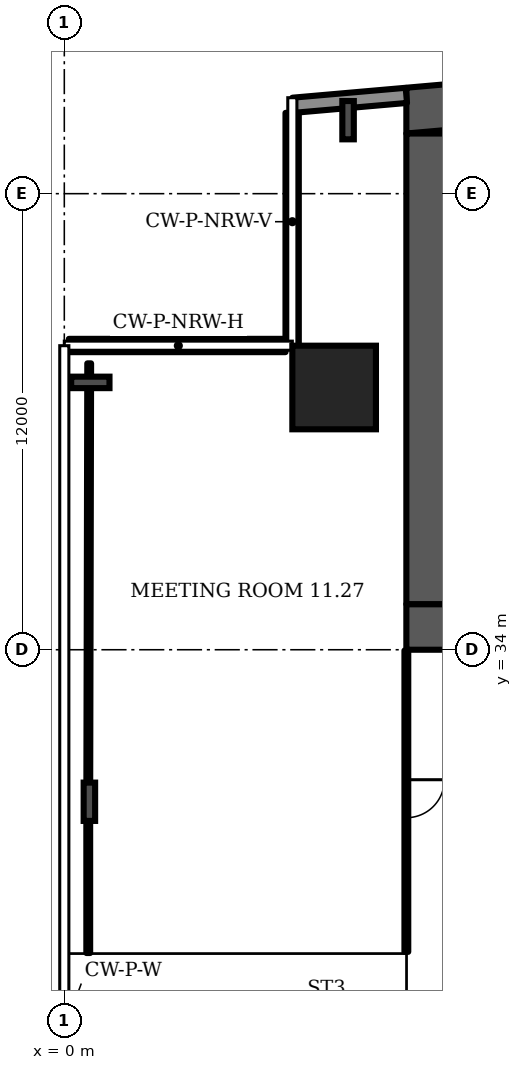
"""IFC4 building model, lengths in metres.
Left out: names, types, materials, properties, quantities, classifications, styles, units other than length and angle.
Written with IfcOpenShell. Run it as: python <this file> out.ifc"""

import sys

from ifc_helpers import new_model, si_unit, direction, frame, frame_2d, origin, origin_2d, place, context, subcontext, project, spatial, polyline, rectangle, i_section, outline, extrude, element, fill, save


model = new_model("IFC4")
c1 = context("Model", 3, precision=1e-05, world=origin(), true_north=direction((0.0, 1.0)))
c2 = subcontext(c1, "Body", "Model", "MODEL_VIEW")
j1 = project(units=[si_unit("LENGTHUNIT", "METRE"), si_unit("PLANEANGLEUNIT", "RADIAN")], contexts=[c1])
p1 = place(None, origin())
s1 = spatial("IfcSite", under=j1, at=p1, CompositionType="ELEMENT")
p2 = place(p1, origin())
s2 = spatial("IfcBuilding", under=s1, at=p2, CompositionType="ELEMENT")
p3 = place(p2, frame((0.0, 0.0, 59.5)))
s3 = spatial("IfcBuildingStorey", under=s2, at=p3, CompositionType="ELEMENT", Elevation=59.5)
p4 = place(p3, origin())
e1 = element("IfcWall", 1, at=p4, inside=s3, PredefinedType="SHEAR", context=c2, shape_type="SweptSolid", body=[
    extrude(outline(polyline([(9.0, 47.583), (37.0, 50.032), (65.0, 47.583), (65.0, 48.787), (37.0, 51.237), (9.0, 48.787), (9.0, 47.583)])), origin(), (0.0, 0.0, 1.0), 3.6),
])
p5 = place(p3, frame((9.0, 34.6, 0.0), z_axis=(0.0, 0.0, 1.0), x_axis=(1.0, 0.0, 0.0)))
e2 = element("IfcWall", 2, at=p5, inside=s3, PredefinedType="SHEAR", context=c2, shape_type="SweptSolid", body=[
    extrude(rectangle(XDim=56.0, YDim=1.2, at=frame_2d((28.0, 0.0))), origin(), (0.0, 0.0, 1.0), 3.6),
])
p6 = place(p5, frame((2.0, 0.0, 0.0)))
e3 = element("IfcOpeningElement", 3, at=p6, cuts=e2, PredefinedType="OPENING", context=c2, shape_type="SweptSolid", body=[
    extrude(rectangle(XDim=1.0, YDim=2.1, at=frame_2d((0.5, 1.05))), frame((0.0, 0.61, 0.0), z_axis=(0.0, -1.0, 0.0), x_axis=(1.0, 0.0, 0.0)), (0.0, 0.0, 1.0), 1.22),
])
p7 = place(p5, frame((4.6, 0.0, 0.0)))
e4 = element("IfcOpeningElement", 4, at=p7, cuts=e2, PredefinedType="OPENING", context=c2, shape_type="SweptSolid", body=[
    extrude(rectangle(XDim=1.0, YDim=2.1, at=frame_2d((0.5, 1.05))), frame((0.0, 0.61, 0.0), z_axis=(0.0, -1.0, 0.0), x_axis=(1.0, 0.0, 0.0)), (0.0, 0.0, 1.0), 1.22),
])
p8 = place(p5, frame((7.867, 0.0, 0.0)))
e5 = element("IfcOpeningElement", 5, at=p8, cuts=e2, PredefinedType="OPENING", context=c2, shape_type="SweptSolid", body=[
    extrude(rectangle(XDim=1.1, YDim=2.1, at=frame_2d((0.55, 1.05))), frame((0.0, 0.61, 0.0), z_axis=(0.0, -1.0, 0.0), x_axis=(1.0, 0.0, 0.0)), (0.0, 0.0, 1.0), 1.22),
])
p9 = place(p5, frame((12.033, 0.0, 0.0)))
e6 = element("IfcOpeningElement", 6, at=p9, cuts=e2, PredefinedType="OPENING", context=c2, shape_type="SweptSolid", body=[
    extrude(rectangle(XDim=1.1, YDim=2.1, at=frame_2d((0.55, 1.05))), frame((0.0, 0.61, 0.0), z_axis=(0.0, -1.0, 0.0), x_axis=(1.0, 0.0, 0.0)), (0.0, 0.0, 1.0), 1.22),
])
p10 = place(p5, frame((9.8, 0.0, 0.0)))
e7 = element("IfcOpeningElement", 7, at=p10, cuts=e2, PredefinedType="OPENING", context=c2, shape_type="SweptSolid", body=[
    extrude(rectangle(XDim=1.4, YDim=2.1, at=frame_2d((0.7, 1.05))), frame((0.0, 0.61, 0.0), z_axis=(0.0, -1.0, 0.0), x_axis=(1.0, 0.0, 0.0)), (0.0, 0.0, 1.0), 1.22),
])
p11 = place(p5, frame((14.65, 0.0, 0.0)))
e8 = element("IfcOpeningElement", 8, at=p11, cuts=e2, PredefinedType="OPENING", context=c2, shape_type="SweptSolid", body=[
    extrude(rectangle(XDim=1.2, YDim=2.1, at=frame_2d((0.6, 1.05))), frame((0.0, 0.61, 0.0), z_axis=(0.0, -1.0, 0.0), x_axis=(1.0, 0.0, 0.0)), (0.0, 0.0, 1.0), 1.22),
])
p12 = place(p5, frame((21.867, 0.0, 0.0)))
e9 = element("IfcOpeningElement", 9, at=p12, cuts=e2, PredefinedType="OPENING", context=c2, shape_type="SweptSolid", body=[
    extrude(rectangle(XDim=1.1, YDim=2.1, at=frame_2d((0.55, 1.05))), frame((0.0, 0.61, 0.0), z_axis=(0.0, -1.0, 0.0), x_axis=(1.0, 0.0, 0.0)), (0.0, 0.0, 1.0), 1.22),
])
p13 = place(p5, frame((26.033, 0.0, 0.0)))
e10 = element("IfcOpeningElement", 10, at=p13, cuts=e2, PredefinedType="OPENING", context=c2, shape_type="SweptSolid", body=[
    extrude(rectangle(XDim=1.1, YDim=2.1, at=frame_2d((0.55, 1.05))), frame((0.0, 0.61, 0.0), z_axis=(0.0, -1.0, 0.0), x_axis=(1.0, 0.0, 0.0)), (0.0, 0.0, 1.0), 1.22),
])
p14 = place(p5, frame((23.8, 0.0, 0.0)))
e11 = element("IfcOpeningElement", 11, at=p14, cuts=e2, PredefinedType="OPENING", context=c2, shape_type="SweptSolid", body=[
    extrude(rectangle(XDim=1.4, YDim=2.1, at=frame_2d((0.7, 1.05))), frame((0.0, 0.61, 0.0), z_axis=(0.0, -1.0, 0.0), x_axis=(1.0, 0.0, 0.0)), (0.0, 0.0, 1.0), 1.22),
])
p15 = place(p5, frame((28.867, 0.0, 0.0)))
e12 = element("IfcOpeningElement", 12, at=p15, cuts=e2, PredefinedType="OPENING", context=c2, shape_type="SweptSolid", body=[
    extrude(rectangle(XDim=1.1, YDim=2.1, at=frame_2d((0.55, 1.05))), frame((0.0, 0.61, 0.0), z_axis=(0.0, -1.0, 0.0), x_axis=(1.0, 0.0, 0.0)), (0.0, 0.0, 1.0), 1.22),
])
p16 = place(p5, frame((33.033, 0.0, 0.0)))
e13 = element("IfcOpeningElement", 13, at=p16, cuts=e2, PredefinedType="OPENING", context=c2, shape_type="SweptSolid", body=[
    extrude(rectangle(XDim=1.1, YDim=2.1, at=frame_2d((0.55, 1.05))), frame((0.0, 0.61, 0.0), z_axis=(0.0, -1.0, 0.0), x_axis=(1.0, 0.0, 0.0)), (0.0, 0.0, 1.0), 1.22),
])
p17 = place(p5, frame((40.15, 0.0, 0.0)))
e14 = element("IfcOpeningElement", 14, at=p17, cuts=e2, PredefinedType="OPENING", context=c2, shape_type="SweptSolid", body=[
    extrude(rectangle(XDim=1.2, YDim=2.1, at=frame_2d((0.6, 1.05))), frame((0.0, 0.61, 0.0), z_axis=(0.0, -1.0, 0.0), x_axis=(1.0, 0.0, 0.0)), (0.0, 0.0, 1.0), 1.22),
])
p18 = place(p5, frame((44.8, 0.0, 0.0)))
e15 = element("IfcOpeningElement", 15, at=p18, cuts=e2, PredefinedType="OPENING", context=c2, shape_type="SweptSolid", body=[
    extrude(rectangle(XDim=1.4, YDim=2.1, at=frame_2d((0.7, 1.05))), frame((0.0, 0.61, 0.0), z_axis=(0.0, -1.0, 0.0), x_axis=(1.0, 0.0, 0.0)), (0.0, 0.0, 1.0), 1.22),
])
p19 = place(p5, frame((49.867, 0.0, 0.0)))
e16 = element("IfcOpeningElement", 16, at=p19, cuts=e2, PredefinedType="OPENING", context=c2, shape_type="SweptSolid", body=[
    extrude(rectangle(XDim=1.1, YDim=2.1, at=frame_2d((0.55, 1.05))), frame((0.0, 0.61, 0.0), z_axis=(0.0, -1.0, 0.0), x_axis=(1.0, 0.0, 0.0)), (0.0, 0.0, 1.0), 1.22),
])
p20 = place(p5, frame((53.5, 0.0, 0.0)))
e17 = element("IfcOpeningElement", 17, at=p20, cuts=e2, PredefinedType="OPENING", context=c2, shape_type="SweptSolid", body=[
    extrude(rectangle(XDim=1.1, YDim=2.1, at=frame_2d((0.55, 1.05))), frame((0.0, 0.61, 0.0), z_axis=(0.0, -1.0, 0.0), x_axis=(1.0, 0.0, 0.0)), (0.0, 0.0, 1.0), 1.22),
])
p21 = place(p5, frame((51.567, 0.0, 0.0)))
e18 = element("IfcOpeningElement", 18, at=p21, cuts=e2, PredefinedType="OPENING", context=c2, shape_type="SweptSolid", body=[
    extrude(rectangle(XDim=1.4, YDim=2.1, at=frame_2d((0.7, 1.05))), frame((0.0, 0.61, 0.0), z_axis=(0.0, -1.0, 0.0), x_axis=(1.0, 0.0, 0.0)), (0.0, 0.0, 1.0), 1.22),
])
p22 = place(p3, frame((9.6, 35.2, 0.0), z_axis=(0.0, 0.0, 1.0), x_axis=(0.0, 1.0, 0.0)))
e19 = element("IfcWall", 19, at=p22, inside=s3, PredefinedType="SHEAR", context=c2, shape_type="SweptSolid", body=[
    extrude(rectangle(XDim=12.383, YDim=1.2, at=frame_2d((6.191, 0.0))), origin(), (0.0, 0.0, 1.0), 3.6),
])
p23 = place(p3, frame((7.1, 40.9, 0.0), z_axis=(0.0, 0.0, 1.0), x_axis=(1.0, 0.0, 0.0)))
e20 = element("IfcColumn", 20, at=p23, inside=s3, PredefinedType="COLUMN", context=c2, shape_type="SweptSolid", body=[
    extrude(rectangle(XDim=2.2, YDim=2.2, at=origin_2d()), origin(), (0.0, 0.0, 1.0), 3.6),
])
for number, where, z_axis, x_axis in (
    (21, (7.467, 47.934, 0.0), (0.0, 0.0, 1.0), (-1.0, 0.0, 0.0)),
    (22, (0.685, 41.034, 0.0), (0.0, 0.0, 1.0), (0.0, 1.0, 0.0)),
    (23, (0.66, 30.0, 0.0), (0.0, 0.0, 1.0), (-1.0, 0.0, 0.0)),
):
    element("IfcColumn", number, at=place(p3, frame(where, z_axis=z_axis, x_axis=x_axis)), inside=s3, PredefinedType="COLUMN", context=c2, shape_type="SweptSolid", body=[
        extrude(i_section(OverallWidth=0.302, OverallDepth=1.008, WebThickness=0.021, FlangeThickness=0.04, FilletRadius=0.03, at=origin_2d()), origin(), (0.0, 0.0, 1.0), 3.6),
    ])
p24 = place(p3, frame((9.0, 48.587, 0.0), z_axis=(0.0, 0.0, 1.0), x_axis=(-0.996194, -0.087168, 0.0)))
e24 = element("IfcWall", 24, at=p24, inside=s3, PredefinedType="SOLIDWALL", context=c2, shape_type="SweptSolid", body=[
    extrude(rectangle(XDim=2.994, YDim=0.4, at=frame_2d((1.497, 0.0))), origin(), (0.0, 0.0, 1.0), 3.2),
])
p25 = place(p3, frame((5.995, 48.126, 0.0), z_axis=(0.0, 0.0, 1.0), x_axis=(0.0, -1.0, 0.0)))
e25 = element("IfcWall", 25, at=p25, inside=s3, PredefinedType="SOLIDWALL", context=c2, shape_type="SweptSolid", body=[
    extrude(rectangle(XDim=6.126, YDim=0.35, at=frame_2d((3.063, 0.0))), origin(), (0.0, 0.0, 1.0), 1.0),
])
p26 = place(p3, frame((5.82, 42.005, 0.0), z_axis=(0.0, 0.0, 1.0), x_axis=(-1.0, 0.0, 0.0)))
e26 = element("IfcWall", 26, at=p26, inside=s3, PredefinedType="SOLIDWALL", context=c2, shape_type="SweptSolid", body=[
    extrude(rectangle(XDim=5.7, YDim=0.35, at=frame_2d((2.85, 0.0))), origin(), (0.0, 0.0, 1.0), 1.0),
])
p27 = place(p3, frame((0.63, 26.02, 0.0), z_axis=(0.0, 0.0, 1.0), x_axis=(0.0, 1.0, 0.0)))
e27 = element("IfcWall", 27, at=p27, inside=s3, PredefinedType="PARTITIONING", context=c2, shape_type="SweptSolid", body=[
    extrude(rectangle(XDim=3.98, YDim=0.1, at=frame_2d((1.99, 0.0))), origin(), (0.0, 0.0, 1.0), 2.58),
])
p28 = place(p3, frame((0.63, 30.0, 0.0), z_axis=(0.0, 0.0, 1.0), x_axis=(0.00218, 0.999994, 0.0)))
e28 = element("IfcWall", 28, at=p28, inside=s3, PredefinedType="PARTITIONING", context=c2, shape_type="SweptSolid", body=[
    extrude(rectangle(XDim=11.535, YDim=0.1, at=frame_2d((5.768, 0.0))), origin(), (0.0, 0.0, 1.0), 2.58),
])
p29 = place(p3, frame((9.0, 26.05, 0.0), z_axis=(0.0, 0.0, 1.0), x_axis=(0.0, 1.0, 0.0)))
e29 = element("IfcWall", 29, at=p29, inside=s3, PredefinedType="PARTITIONING", context=c2, shape_type="SweptSolid", body=[
    extrude(rectangle(XDim=7.93, YDim=0.1, at=frame_2d((3.965, 0.0))), origin(), (0.0, 0.0, 1.0), 3.2),
])
p30 = place(p29, frame((3.53, 0.0, 0.0)))
e30 = element("IfcOpeningElement", 30, at=p30, cuts=e29, PredefinedType="OPENING", context=c2, shape_type="SweptSolid", body=[
    extrude(rectangle(XDim=1.0, YDim=2.1, at=frame_2d((0.5, 1.05))), frame((0.0, 0.06, 0.0), z_axis=(0.0, -1.0, 0.0), x_axis=(1.0, 0.0, 0.0)), (0.0, 0.0, 1.0), 0.12),
])
p31 = place(p30, origin())
e31 = element("IfcDoor", 31, at=p31, inside=s3, OperationType="SINGLE_SWING_RIGHT", PredefinedType="DOOR", context=c2, shape_type="SweptSolid", body=[
    extrude(rectangle(XDim=1.0, YDim=2.1, at=frame_2d((0.5, 1.05))), frame((0.0, 0.025, 0.0), z_axis=(0.0, -1.0, 0.0), x_axis=(1.0, 0.0, 0.0)), (0.0, 0.0, 1.0), 0.05),
])
fill(e30, e31)
save(model, sys.argv[1])
